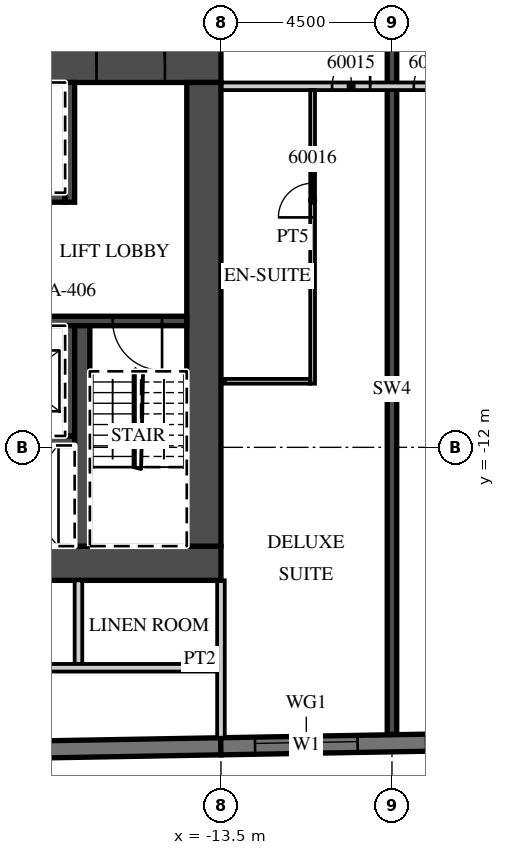
"""IFC4 building model, lengths in metres.
Left out: names, types, materials, properties, quantities, classifications, styles, units other than length and angle.
Written with IfcOpenShell. Run it as: python <this file> out.ifc"""

import sys

from ifc_helpers import new_model, si_unit, direction, frame, frame_2d, origin, place, context, subcontext, project, spatial, rectangle, extrude, element, fill, save


model = new_model("IFC4")
c1 = context("Model", 3, precision=1e-05, world=origin(), true_north=direction((0.0, 1.0)))
c2 = subcontext(c1, "Body", "Model", "MODEL_VIEW")
j1 = project(units=[si_unit("LENGTHUNIT", "METRE"), si_unit("PLANEANGLEUNIT", "RADIAN")], contexts=[c1])
p1 = place(None, origin())
s1 = spatial("IfcSite", under=j1, at=p1, CompositionType="ELEMENT")
p2 = place(p1, origin())
s2 = spatial("IfcBuilding", under=s1, at=p2, CompositionType="ELEMENT")
p3 = place(p2, frame((0.0, 0.0, 244.1)))
s3 = spatial("IfcBuildingStorey", under=s2, at=p3, CompositionType="ELEMENT", Elevation=244.1)
p4 = place(p3, frame((-9.0, -19.55, 0.0), z_axis=(0.0, 0.0, 1.0), x_axis=(0.0, 1.0, 0.0)))
e1 = element("IfcWall", 1, at=p4, inside=s3, PredefinedType="SHEAR", context=c2, shape_type="SweptSolid", body=[
    extrude(rectangle(XDim=18.15, YDim=0.25, at=frame_2d((9.075, 0.0))), origin(), (0.0, 0.0, 1.0), 3.3),
])
p5 = place(p3, frame((-31.504, -20.18, 0.0), z_axis=(0.0, 0.0, 1.0), x_axis=(0.999847677887, 0.017453395744, 0.0)))
e2 = element("IfcWall", 2, at=p5, inside=s3, PredefinedType="SOLIDWALL", context=c2, shape_type="SweptSolid", body=[
    extrude(rectangle(XDim=18.003, YDim=0.45, at=frame_2d((9.001, 0.0))), origin(), (0.0, 0.0, 1.0), 3.02),
])
p6 = place(p3, frame((-13.504, -19.866, 0.0), z_axis=(0.0, 0.0, 1.0), x_axis=(0.999847672978, 0.017453676992, 0.0)))
e3 = element("IfcWall", 3, at=p6, inside=s3, PredefinedType="SOLIDWALL", context=c2, shape_type="SweptSolid", body=[
    extrude(rectangle(XDim=52.86, YDim=0.45, at=frame_2d((26.43, 0.0))), origin(), (0.0, 0.0, 1.0), 3.02),
])
p7 = place(p6, frame((0.9, 0.0, 0.45)))
e4 = element("IfcOpeningElement", 4, at=p7, cuts=e3, PredefinedType="OPENING", context=c2, shape_type="SweptSolid", body=[
    extrude(rectangle(XDim=2.7, YDim=2.25, at=frame_2d((1.35, 1.125))), frame((0.0, 0.235, 0.0), z_axis=(0.0, -1.0, 0.0), x_axis=(1.0, 0.0, 0.0)), (0.0, 0.0, 1.0), 0.47),
])
p8 = place(p6, frame((5.401, 0.0, 0.45)))
e5 = element("IfcOpeningElement", 5, at=p8, cuts=e3, PredefinedType="OPENING", context=c2, shape_type="SweptSolid", body=[
    extrude(rectangle(XDim=2.7, YDim=2.25, at=frame_2d((1.35, 1.125))), frame((0.0, 0.235, 0.0), z_axis=(0.0, -1.0, 0.0), x_axis=(1.0, 0.0, 0.0)), (0.0, 0.0, 1.0), 0.47),
])
p9 = place(p6, frame((9.902, 0.0, 0.45)))
e6 = element("IfcOpeningElement", 6, at=p9, cuts=e3, PredefinedType="OPENING", context=c2, shape_type="SweptSolid", body=[
    extrude(rectangle(XDim=2.7, YDim=2.25, at=frame_2d((1.35, 1.125))), frame((0.0, 0.235, 0.0), z_axis=(0.0, -1.0, 0.0), x_axis=(1.0, 0.0, 0.0)), (0.0, 0.0, 1.0), 0.47),
])
p10 = place(p6, frame((14.402, 0.0, 0.45)))
e7 = element("IfcOpeningElement", 7, at=p10, cuts=e3, PredefinedType="OPENING", context=c2, shape_type="SweptSolid", body=[
    extrude(rectangle(XDim=2.7, YDim=2.25, at=frame_2d((1.35, 1.125))), frame((0.0, 0.235, 0.0), z_axis=(0.0, -1.0, 0.0), x_axis=(1.0, 0.0, 0.0)), (0.0, 0.0, 1.0), 0.47),
])
p11 = place(p6, frame((18.903, 0.0, 0.45)))
e8 = element("IfcOpeningElement", 8, at=p11, cuts=e3, PredefinedType="OPENING", context=c2, shape_type="SweptSolid", body=[
    extrude(rectangle(XDim=2.7, YDim=2.25, at=frame_2d((1.35, 1.125))), frame((0.0, 0.235, 0.0), z_axis=(0.0, -1.0, 0.0), x_axis=(1.0, 0.0, 0.0)), (0.0, 0.0, 1.0), 0.47),
])
p12 = place(p6, frame((23.404, 0.0, 0.45)))
e9 = element("IfcOpeningElement", 9, at=p12, cuts=e3, PredefinedType="OPENING", context=c2, shape_type="SweptSolid", body=[
    extrude(rectangle(XDim=2.7, YDim=2.25, at=frame_2d((1.35, 1.125))), frame((0.0, 0.235, 0.0), z_axis=(0.0, -1.0, 0.0), x_axis=(1.0, 0.0, 0.0)), (0.0, 0.0, 1.0), 0.47),
])
p13 = place(p6, frame((27.904, 0.0, 0.45)))
e10 = element("IfcOpeningElement", 10, at=p13, cuts=e3, PredefinedType="OPENING", context=c2, shape_type="SweptSolid", body=[
    extrude(rectangle(XDim=2.7, YDim=2.25, at=frame_2d((1.35, 1.125))), frame((0.0, 0.235, 0.0), z_axis=(0.0, -1.0, 0.0), x_axis=(1.0, 0.0, 0.0)), (0.0, 0.0, 1.0), 0.47),
])
p14 = place(p6, frame((32.405, 0.0, 0.45)))
e11 = element("IfcOpeningElement", 11, at=p14, cuts=e3, PredefinedType="OPENING", context=c2, shape_type="SweptSolid", body=[
    extrude(rectangle(XDim=2.7, YDim=2.25, at=frame_2d((1.35, 1.125))), frame((0.0, 0.235, 0.0), z_axis=(0.0, -1.0, 0.0), x_axis=(1.0, 0.0, 0.0)), (0.0, 0.0, 1.0), 0.47),
])
p15 = place(p6, frame((36.906, 0.0, 0.45)))
e12 = element("IfcOpeningElement", 12, at=p15, cuts=e3, PredefinedType="OPENING", context=c2, shape_type="SweptSolid", body=[
    extrude(rectangle(XDim=2.7, YDim=2.25, at=frame_2d((1.35, 1.125))), frame((0.0, 0.235, 0.0), z_axis=(0.0, -1.0, 0.0), x_axis=(1.0, 0.0, 0.0)), (0.0, 0.0, 1.0), 0.47),
])
p16 = place(p6, frame((41.406, 0.0, 0.45)))
e13 = element("IfcOpeningElement", 13, at=p16, cuts=e3, PredefinedType="OPENING", context=c2, shape_type="SweptSolid", body=[
    extrude(rectangle(XDim=2.7, YDim=2.25, at=frame_2d((1.35, 1.125))), frame((0.0, 0.235, 0.0), z_axis=(0.0, -1.0, 0.0), x_axis=(1.0, 0.0, 0.0)), (0.0, 0.0, 1.0), 0.47),
])
p17 = place(p6, frame((45.907, 0.0, 0.45)))
e14 = element("IfcOpeningElement", 14, at=p17, cuts=e3, PredefinedType="OPENING", context=c2, shape_type="SweptSolid", body=[
    extrude(rectangle(XDim=2.7, YDim=2.25, at=frame_2d((1.35, 1.125))), frame((0.0, 0.235, 0.0), z_axis=(0.0, -1.0, 0.0), x_axis=(1.0, 0.0, 0.0)), (0.0, 0.0, 1.0), 0.47),
])
p18 = place(p3, frame((-13.5, -19.641, 0.0), z_axis=(0.0, 0.0, 1.0), x_axis=(0.0, 1.0, 0.0)))
e15 = element("IfcWall", 15, at=p18, inside=s3, PredefinedType="PARTITIONING", context=c2, shape_type="SweptSolid", body=[
    extrude(rectangle(XDim=4.141, YDim=0.2, at=frame_2d((2.071, 0.0))), origin(), (0.0, 0.0, 1.0), 3.02),
])
p19 = place(p3, frame((-13.5, -2.5, 0.0), z_axis=(0.0, 0.0, 1.0), x_axis=(1.0, 0.0, 0.0)))
e16 = element("IfcWall", 16, at=p19, inside=s3, PredefinedType="PARTITIONING", context=c2, shape_type="SweptSolid", body=[
    extrude(rectangle(XDim=27.0, YDim=0.2, at=frame_2d((13.5, 0.0))), origin(), (0.0, 0.0, 1.0), 3.02),
])
p20 = place(p19, frame((2.925, 0.0, 0.0)))
e17 = element("IfcOpeningElement", 17, at=p20, cuts=e16, PredefinedType="OPENING", context=c2, shape_type="SweptSolid", body=[
    extrude(rectangle(XDim=1.0, YDim=2.1, at=frame_2d((0.5, 1.05))), frame((0.0, 0.11, 0.0), z_axis=(0.0, -1.0, 0.0), x_axis=(1.0, 0.0, 0.0)), (0.0, 0.0, 1.0), 0.22),
])
p21 = place(p19, frame((5.075, 0.0, 0.0)))
e18 = element("IfcOpeningElement", 18, at=p21, cuts=e16, PredefinedType="OPENING", context=c2, shape_type="SweptSolid", body=[
    extrude(rectangle(XDim=1.0, YDim=2.1, at=frame_2d((0.5, 1.05))), frame((0.0, 0.11, 0.0), z_axis=(0.0, -1.0, 0.0), x_axis=(1.0, 0.0, 0.0)), (0.0, 0.0, 1.0), 0.22),
])
p22 = place(p19, frame((9.55, 0.0, 0.0)))
e19 = element("IfcOpeningElement", 19, at=p22, cuts=e16, PredefinedType="OPENING", context=c2, shape_type="SweptSolid", body=[
    extrude(rectangle(XDim=1.0, YDim=2.1, at=frame_2d((0.5, 1.05))), frame((0.0, 0.11, 0.0), z_axis=(0.0, -1.0, 0.0), x_axis=(1.0, 0.0, 0.0)), (0.0, 0.0, 1.0), 0.22),
])
p23 = place(p19, frame((14.075, 0.0, 0.0)))
e20 = element("IfcOpeningElement", 20, at=p23, cuts=e16, PredefinedType="OPENING", context=c2, shape_type="SweptSolid", body=[
    extrude(rectangle(XDim=1.0, YDim=2.1, at=frame_2d((0.5, 1.05))), frame((0.0, 0.11, 0.0), z_axis=(0.0, -1.0, 0.0), x_axis=(1.0, 0.0, 0.0)), (0.0, 0.0, 1.0), 0.22),
])
p24 = place(p19, frame((20.925, 0.0, 0.0)))
e21 = element("IfcOpeningElement", 21, at=p24, cuts=e16, PredefinedType="OPENING", context=c2, shape_type="SweptSolid", body=[
    extrude(rectangle(XDim=1.0, YDim=2.1, at=frame_2d((0.5, 1.05))), frame((0.0, 0.11, 0.0), z_axis=(0.0, -1.0, 0.0), x_axis=(1.0, 0.0, 0.0)), (0.0, 0.0, 1.0), 0.22),
])
p25 = place(p19, frame((23.075, 0.0, 0.0)))
e22 = element("IfcOpeningElement", 22, at=p25, cuts=e16, PredefinedType="OPENING", context=c2, shape_type="SweptSolid", body=[
    extrude(rectangle(XDim=1.0, YDim=2.1, at=frame_2d((0.5, 1.05))), frame((0.0, 0.11, 0.0), z_axis=(0.0, -1.0, 0.0), x_axis=(1.0, 0.0, 0.0)), (0.0, 0.0, 1.0), 0.22),
])
p26 = place(p3, frame((-11.088, -10.325, 0.0), z_axis=(0.0, 0.0, 1.0), x_axis=(0.0, 1.0, 0.0)))
e23 = element("IfcWall", 23, at=p26, inside=s3, PredefinedType="PARTITIONING", context=c2, shape_type="SweptSolid", body=[
    extrude(rectangle(XDim=7.725, YDim=0.125, at=frame_2d((3.862, 0.0))), origin(), (0.0, 0.0, 1.0), 3.02),
])
p27 = place(p26, frame((4.375, 0.0, 0.0)))
e24 = element("IfcOpeningElement", 24, at=p27, cuts=e23, PredefinedType="OPENING", context=c2, shape_type="SweptSolid", body=[
    extrude(rectangle(XDim=0.9, YDim=2.1, at=frame_2d((0.45, 1.05))), frame((0.0, 0.073, 0.0), z_axis=(0.0, -1.0, 0.0), x_axis=(1.0, 0.0, 0.0)), (0.0, 0.0, 1.0), 0.145),
])
p28 = place(p3, frame((-13.4, -10.262, 0.0), z_axis=(0.0, 0.0, 1.0), x_axis=(1.0, 0.0, 0.0)))
e25 = element("IfcWall", 25, at=p28, inside=s3, PredefinedType="PARTITIONING", context=c2, shape_type="SweptSolid", body=[
    extrude(rectangle(XDim=2.25, YDim=0.125, at=frame_2d((1.125, 0.0))), origin(), (0.0, 0.0, 1.0), 3.02),
])
p29 = place(p3, frame((-31.5, -1.95, 0.0), z_axis=(0.0, 0.0, 1.0), x_axis=(1.0, 0.0, 0.0)))
e26 = element("IfcWall", 26, at=p29, inside=s3, PredefinedType="SHEAR", context=c2, shape_type="SweptSolid", body=[
    extrude(rectangle(XDim=18.0, YDim=0.9, at=frame_2d((9.0, 0.0))), origin(), (0.0, 0.0, 1.0), 3.02),
])
p30 = place(p29, frame((14.725, 0.0, 0.0)))
e27 = element("IfcOpeningElement", 27, at=p30, cuts=e26, PredefinedType="OPENING", context=c2, shape_type="SweptSolid", body=[
    extrude(rectangle(XDim=1.8, YDim=2.1, at=frame_2d((0.9, 1.05))), frame((0.0, 0.46, 0.0), z_axis=(0.0, -1.0, 0.0), x_axis=(1.0, 0.0, 0.0)), (0.0, 0.0, 1.0), 0.92),
])
p31 = place(p3, frame((-20.3, -15.05, 0.0), z_axis=(0.0, 0.0, 1.0), x_axis=(1.0, 0.0, 0.0)))
e28 = element("IfcWall", 28, at=p31, inside=s3, PredefinedType="SHEAR", context=c2, shape_type="SweptSolid", body=[
    extrude(rectangle(XDim=6.8, YDim=0.9, at=frame_2d((3.4, 0.0))), origin(), (0.0, 0.0, 1.0), 3.02),
])
p32 = place(p31, frame((0.875, 0.0, 0.0)))
e29 = element("IfcOpeningElement", 29, at=p32, cuts=e28, PredefinedType="OPENING", context=c2, shape_type="SweptSolid", body=[
    extrude(rectangle(XDim=1.2, YDim=2.1, at=frame_2d((0.6, 1.05))), frame((0.0, 0.46, 0.0), z_axis=(0.0, -1.0, 0.0), x_axis=(1.0, 0.0, 0.0)), (0.0, 0.0, 1.0), 0.92),
])
p33 = place(p3, frame((-13.95, -14.6, 0.0), z_axis=(0.0, 0.0, 1.0), x_axis=(0.0, 1.0, 0.0)))
e30 = element("IfcWall", 30, at=p33, inside=s3, PredefinedType="SHEAR", context=c2, shape_type="SweptSolid", body=[
    extrude(rectangle(XDim=12.2, YDim=0.9, at=frame_2d((6.1, 0.0))), origin(), (0.0, 0.0, 1.0), 3.02),
])
p34 = place(p3, frame((-30.6, -5.425, 0.0), z_axis=(0.0, 0.0, 1.0), x_axis=(1.0, 0.0, 0.0)))
e31 = element("IfcWall", 31, at=p34, inside=s3, PredefinedType="SHEAR", context=c2, shape_type="SweptSolid", body=[
    extrude(rectangle(XDim=13.0, YDim=0.25, at=frame_2d((6.5, 0.0))), origin(), (0.0, 0.0, 1.0), 3.02),
])
p35 = place(p34, frame((3.325, 0.0, 0.0)))
e32 = element("IfcOpeningElement", 32, at=p35, cuts=e31, PredefinedType="OPENING", context=c2, shape_type="SweptSolid", body=[
    extrude(rectangle(XDim=1.2, YDim=2.1, at=frame_2d((0.6, 1.05))), frame((0.0, 0.135, 0.0), z_axis=(0.0, -1.0, 0.0), x_axis=(1.0, 0.0, 0.0)), (0.0, 0.0, 1.0), 0.27),
])
p36 = place(p34, frame((5.925, 0.0, 0.0)))
e33 = element("IfcOpeningElement", 33, at=p36, cuts=e31, PredefinedType="OPENING", context=c2, shape_type="SweptSolid", body=[
    extrude(rectangle(XDim=1.2, YDim=2.1, at=frame_2d((0.6, 1.05))), frame((0.0, 0.135, 0.0), z_axis=(0.0, -1.0, 0.0), x_axis=(1.0, 0.0, 0.0)), (0.0, 0.0, 1.0), 0.27),
])
p37 = place(p3, frame((-17.475, -5.55, 0.0), z_axis=(0.0, 0.0, 1.0), x_axis=(0.0, 1.0, 0.0)))
e34 = element("IfcWall", 34, at=p37, inside=s3, PredefinedType="SHEAR", context=c2, shape_type="SweptSolid", body=[
    extrude(rectangle(XDim=3.15, YDim=0.25, at=frame_2d((1.575, 0.0))), origin(), (0.0, 0.0, 1.0), 3.02),
])
p38 = place(p3, frame((-30.6, -8.675, 0.0), z_axis=(0.0, 0.0, 1.0), x_axis=(1.0, 0.0, 0.0)))
e35 = element("IfcWall", 35, at=p38, inside=s3, PredefinedType="SHEAR", context=c2, shape_type="SweptSolid", body=[
    extrude(rectangle(XDim=16.2, YDim=0.25, at=frame_2d((8.1, 0.0))), origin(), (0.0, 0.0, 1.0), 3.02),
])
p39 = place(p38, frame((8.55, 0.0, 0.0)))
e36 = element("IfcOpeningElement", 36, at=p39, cuts=e35, PredefinedType="OPENING", context=c2, shape_type="SweptSolid", body=[
    extrude(rectangle(XDim=1.2, YDim=2.1, at=frame_2d((0.6, 1.05))), frame((0.0, 0.135, 0.0), z_axis=(0.0, -1.0, 0.0), x_axis=(1.0, 0.0, 0.0)), (0.0, 0.0, 1.0), 0.27),
])
p40 = place(p38, frame((11.2, 0.0, 0.0)))
e37 = element("IfcOpeningElement", 37, at=p40, cuts=e35, PredefinedType="OPENING", context=c2, shape_type="SweptSolid", body=[
    extrude(rectangle(XDim=1.2, YDim=2.1, at=frame_2d((0.6, 1.05))), frame((0.0, 0.135, 0.0), z_axis=(0.0, -1.0, 0.0), x_axis=(1.0, 0.0, 0.0)), (0.0, 0.0, 1.0), 0.27),
])
p41 = place(p38, frame((14.25, 0.0, 0.0)))
e38 = element("IfcOpeningElement", 38, at=p41, cuts=e35, PredefinedType="OPENING", context=c2, shape_type="SweptSolid", body=[
    extrude(rectangle(XDim=1.3, YDim=2.1, at=frame_2d((0.65, 1.05))), frame((0.0, 0.135, 0.0), z_axis=(0.0, -1.0, 0.0), x_axis=(1.0, 0.0, 0.0)), (0.0, 0.0, 1.0), 0.27),
])
p42 = place(p38, frame((1.087, 0.0, 0.0)))
e39 = element("IfcOpeningElement", 39, at=p42, cuts=e35, PredefinedType="OPENING", context=c2, shape_type="SweptSolid", body=[
    extrude(rectangle(XDim=1.0, YDim=2.1, at=frame_2d((0.5, 1.05))), frame((0.0, 0.135, 0.0), z_axis=(0.0, -1.0, 0.0), x_axis=(1.0, 0.0, 0.0)), (0.0, 0.0, 1.0), 0.27),
])
p43 = place(p38, frame((5.062, 0.0, 0.0)))
e40 = element("IfcOpeningElement", 40, at=p43, cuts=e35, PredefinedType="OPENING", context=c2, shape_type="SweptSolid", body=[
    extrude(rectangle(XDim=1.0, YDim=2.1, at=frame_2d((0.5, 1.05))), frame((0.0, 0.135, 0.0), z_axis=(0.0, -1.0, 0.0), x_axis=(1.0, 0.0, 0.0)), (0.0, 0.0, 1.0), 0.27),
])
p44 = place(p3, frame((-30.6, -11.825, 0.0), z_axis=(0.0, 0.0, 1.0), x_axis=(1.0, 0.0, 0.0)))
e41 = element("IfcWall", 41, at=p44, inside=s3, PredefinedType="SHEAR", context=c2, shape_type="SweptSolid", body=[
    extrude(rectangle(XDim=13.25, YDim=0.25, at=frame_2d((6.625, 0.0))), origin(), (0.0, 0.0, 1.0), 3.02),
])
p45 = place(p3, frame((-17.475, -11.7, 0.0), z_axis=(0.0, 0.0, 1.0), x_axis=(0.0, 1.0, 0.0)))
e42 = element("IfcWall", 42, at=p45, inside=s3, PredefinedType="SHEAR", context=c2, shape_type="SweptSolid", body=[
    extrude(rectangle(XDim=2.9, YDim=0.25, at=frame_2d((1.45, 0.0))), origin(), (0.0, 0.0, 1.0), 3.02),
])
p46 = place(p3, frame((-17.15, -14.6, 0.0), z_axis=(0.0, 0.0, 1.0), x_axis=(0.0, 1.0, 0.0)))
e43 = element("IfcWall", 43, at=p46, inside=s3, PredefinedType="SHEAR", context=c2, shape_type="SweptSolid", body=[
    extrude(rectangle(XDim=5.8, YDim=0.4, at=frame_2d((2.9, 0.0))), origin(), (0.0, 0.0, 1.0), 3.02),
])
p47 = place(p3, frame((-17.25, -17.7, 0.0), z_axis=(0.0, 0.0, 1.0), x_axis=(0.0, 1.0, 0.0)))
e44 = element("IfcWall", 44, at=p47, inside=s3, PredefinedType="PARTITIONING", context=c2, shape_type="SweptSolid", body=[
    extrude(rectangle(XDim=2.2, YDim=0.2, at=frame_2d((1.1, 0.0))), origin(), (0.0, 0.0, 1.0), 3.02),
])
p48 = place(p3, frame((-35.864, -17.8, 0.0), z_axis=(0.0, 0.0, 1.0), x_axis=(1.0, 0.0, 0.0)))
e45 = element("IfcWall", 45, at=p48, inside=s3, PredefinedType="PARTITIONING", context=c2, shape_type="SweptSolid", body=[
    extrude(rectangle(XDim=22.264, YDim=0.2, at=frame_2d((11.132, 0.0))), origin(), (0.0, 0.0, 1.0), 3.02),
])
p49 = place(p48, frame((4.751, 0.0, 0.0)))
e46 = element("IfcOpeningElement", 46, at=p49, cuts=e45, PredefinedType="OPENING", context=c2, shape_type="SweptSolid", body=[
    extrude(rectangle(XDim=0.9, YDim=2.1, at=frame_2d((0.45, 1.05))), frame((0.0, 0.11, 0.0), z_axis=(0.0, -1.0, 0.0), x_axis=(1.0, 0.0, 0.0)), (0.0, 0.0, 1.0), 0.22),
])
p50 = place(p48, frame((13.051, 0.0, 0.0)))
e47 = element("IfcOpeningElement", 47, at=p50, cuts=e45, PredefinedType="OPENING", context=c2, shape_type="SweptSolid", body=[
    extrude(rectangle(XDim=0.9, YDim=2.1, at=frame_2d((0.45, 1.05))), frame((0.0, 0.11, 0.0), z_axis=(0.0, -1.0, 0.0), x_axis=(1.0, 0.0, 0.0)), (0.0, 0.0, 1.0), 0.22),
])
p51 = place(p7, origin())
e48 = element("IfcWindow", 48, at=p51, inside=s3, PartitioningType="SINGLE_PANEL", PredefinedType="WINDOW", context=c2, shape_type="SweptSolid", body=[
    extrude(rectangle(XDim=2.7, YDim=2.25, at=frame_2d((1.35, 1.125))), frame((0.0, 0.09, 0.0), z_axis=(0.0, -1.0, 0.0), x_axis=(1.0, 0.0, 0.0)), (0.0, 0.0, 1.0), 0.06),
])
fill(e4, e48)
p52 = place(p20, origin())
e49 = element("IfcDoor", 49, at=p52, inside=s3, OperationType="SINGLE_SWING_RIGHT", PredefinedType="DOOR", context=c2, shape_type="SweptSolid", body=[
    extrude(rectangle(XDim=1.0, YDim=2.1, at=frame_2d((0.5, 1.05))), frame((0.0, 0.025, 0.0), z_axis=(0.0, -1.0, 0.0), x_axis=(1.0, 0.0, 0.0)), (0.0, 0.0, 1.0), 0.05),
])
fill(e17, e49)
p53 = place(p27, origin())
e50 = element("IfcDoor", 50, at=p53, inside=s3, OperationType="SINGLE_SWING_LEFT", PredefinedType="DOOR", context=c2, shape_type="SweptSolid", body=[
    extrude(rectangle(XDim=0.9, YDim=2.1, at=frame_2d((0.45, 1.05))), frame((0.0, 0.025, 0.0), z_axis=(0.0, -1.0, 0.0), x_axis=(1.0, 0.0, 0.0)), (0.0, 0.0, 1.0), 0.05),
])
fill(e24, e50)
p54 = place(p21, origin())
e51 = element("IfcDoor", 51, at=p54, inside=s3, OperationType="SINGLE_SWING_RIGHT", PredefinedType="DOOR", context=c2, shape_type="SweptSolid", body=[
    extrude(rectangle(XDim=1.0, YDim=2.1, at=frame_2d((0.5, 1.05))), frame((0.0, 0.025, 0.0), z_axis=(0.0, -1.0, 0.0), x_axis=(1.0, 0.0, 0.0)), (0.0, 0.0, 1.0), 0.05),
])
fill(e18, e51)
p55 = place(p30, origin())
e52 = element("IfcDoor", 52, at=p55, inside=s3, OperationType="DOUBLE_DOOR_DOUBLE_SWING", PredefinedType="DOOR", context=c2, shape_type="SweptSolid", body=[
    extrude(rectangle(XDim=1.8, YDim=2.1, at=frame_2d((0.9, 1.05))), frame((0.0, 0.025, 0.0), z_axis=(0.0, -1.0, 0.0), x_axis=(1.0, 0.0, 0.0)), (0.0, 0.0, 1.0), 0.05),
])
fill(e27, e52)
p56 = place(p41, origin())
e53 = element("IfcDoor", 53, at=p56, inside=s3, OperationType="SINGLE_SWING_RIGHT", PredefinedType="DOOR", context=c2, shape_type="SweptSolid", body=[
    extrude(rectangle(XDim=1.3, YDim=2.1, at=frame_2d((0.65, 1.05))), frame((0.0, 0.025, 0.0), z_axis=(0.0, -1.0, 0.0), x_axis=(1.0, 0.0, 0.0)), (0.0, 0.0, 1.0), 0.05),
])
fill(e38, e53)
save(model, sys.argv[1])
